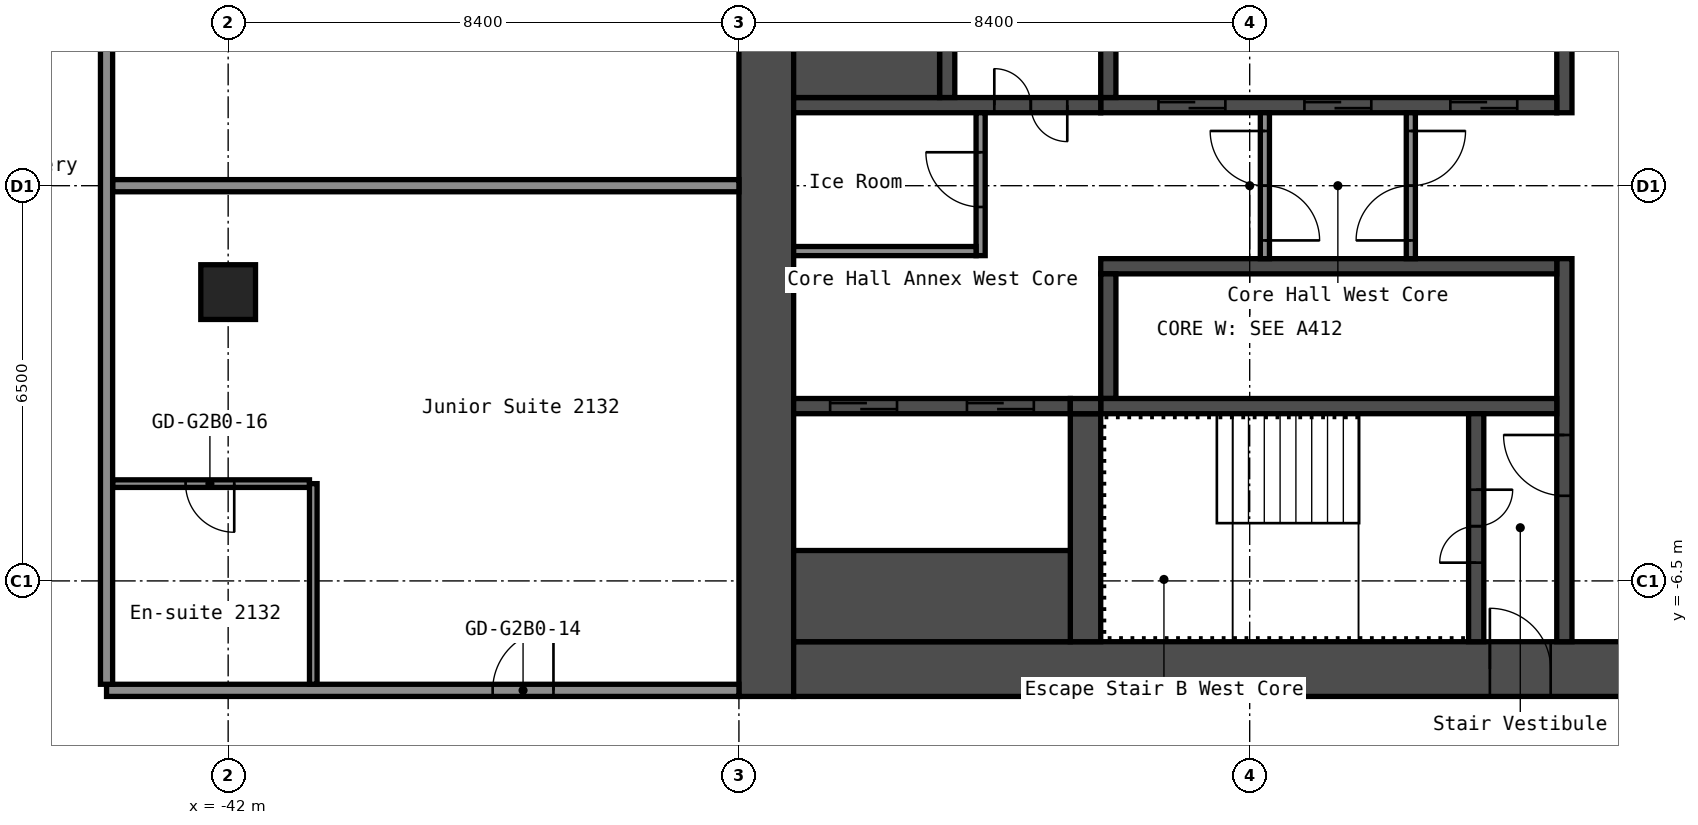
"""IFC4 building model, lengths in metres.
Left out: names, types, materials, properties, quantities, classifications, styles, units other than length and angle.
Written with IfcOpenShell. Run it as: python <this file> out.ifc"""

import sys

from ifc_helpers import new_model, si_unit, direction, frame, frame_2d, origin, origin_2d, place, context, subcontext, project, spatial, rectangle, hollow_rectangle, extrude, element, fill, save


model = new_model("IFC4")
c1 = context("Model", 3, precision=1e-05, world=origin(), true_north=direction((0.0, 1.0)))
c2 = subcontext(c1, "Body", "Model", "MODEL_VIEW")
j1 = project(units=[si_unit("LENGTHUNIT", "METRE"), si_unit("PLANEANGLEUNIT", "RADIAN")], contexts=[c1])
p1 = place(None, origin())
s1 = spatial("IfcSite", under=j1, at=p1, CompositionType="ELEMENT")
p2 = place(p1, origin())
s2 = spatial("IfcBuilding", under=s1, at=p2, CompositionType="ELEMENT")
p3 = place(p2, frame((0.0, 0.0, 78.6)))
s3 = spatial("IfcBuildingStorey", under=s2, at=p3, CompositionType="ELEMENT", Elevation=78.6)
p4 = place(p3, frame((-42.0, -1.75, 0.0), z_axis=(0.0, 0.0, 1.0), x_axis=(1.0, 0.0, 0.0)))
e1 = element("IfcColumn", 1, at=p4, inside=s3, PredefinedType="COLUMN", context=c2, shape_type="SweptSolid", body=[
    extrude(hollow_rectangle(XDim=0.9, YDim=0.9, WallThickness=0.036, at=origin_2d()), origin(), (0.0, 0.0, 1.0), 2.8),
])
p5 = place(p3, frame((-33.15, -8.4, 0.0), z_axis=(0.0, 0.0, 1.0), x_axis=(0.0, 1.0, 0.0)))
e2 = element("IfcWall", 2, at=p5, inside=s3, PredefinedType="SHEAR", context=c2, shape_type="SweptSolid", body=[
    extrude(rectangle(XDim=16.8, YDim=0.9, at=frame_2d((8.4, 0.0))), origin(), (0.0, 0.0, 1.0), 2.8),
])
p6 = place(p3, frame((-32.7, -7.95, 0.0), z_axis=(0.0, 0.0, 1.0), x_axis=(1.0, 0.0, 0.0)))
e3 = element("IfcWall", 3, at=p6, inside=s3, PredefinedType="SHEAR", context=c2, shape_type="SweptSolid", body=[
    extrude(rectangle(XDim=15.0, YDim=0.9, at=frame_2d((7.5, 0.0))), origin(), (0.0, 0.0, 1.0), 2.8),
])
p7 = place(p6, frame((11.45, 0.0, 0.0)))
e4 = element("IfcOpeningElement", 4, at=p7, cuts=e3, PredefinedType="OPENING", context=c2, shape_type="SweptSolid", body=[
    extrude(rectangle(XDim=1.0, YDim=2.1, at=frame_2d((0.5, 1.05))), frame((0.0, 0.46, 0.0), z_axis=(0.0, -1.0, 0.0), x_axis=(1.0, 0.0, 0.0)), (0.0, 0.0, 1.0), 0.92),
])
p8 = place(p3, frame((-20.025, 1.2, 0.0), z_axis=(0.0, 0.0, 1.0), x_axis=(0.0, 1.0, 0.0)))
e5 = element("IfcWall", 5, at=p8, inside=s3, PredefinedType="SHEAR", context=c2, shape_type="SweptSolid", body=[
    extrude(rectangle(XDim=6.3, YDim=0.25, at=frame_2d((3.15, 0.0))), origin(), (0.0, 0.0, 1.0), 2.8),
])
p9 = place(p3, frame((-20.025, -7.5, 0.0), z_axis=(0.0, 0.0, 1.0), x_axis=(0.0, 1.0, 0.0)))
e6 = element("IfcWall", 6, at=p9, inside=s3, PredefinedType="SHEAR", context=c2, shape_type="SweptSolid", body=[
    extrude(rectangle(XDim=6.3, YDim=0.25, at=frame_2d((3.15, 0.0))), origin(), (0.0, 0.0, 1.0), 2.8),
])
p10 = place(p9, frame((2.4, 0.0, 0.0)))
e7 = element("IfcOpeningElement", 7, at=p10, cuts=e6, PredefinedType="OPENING", context=c2, shape_type="SweptSolid", body=[
    extrude(rectangle(XDim=1.0, YDim=2.1, at=frame_2d((0.5, 1.05))), frame((0.0, 0.135, 0.0), z_axis=(0.0, -1.0, 0.0), x_axis=(1.0, 0.0, 0.0)), (0.0, 0.0, 1.0), 0.27),
])
p11 = place(p3, frame((-27.65, 1.325, 0.0), z_axis=(0.0, 0.0, 1.0), x_axis=(1.0, 0.0, 0.0)))
e8 = element("IfcWall", 8, at=p11, inside=s3, PredefinedType="SHEAR", context=c2, shape_type="SweptSolid", body=[
    extrude(rectangle(XDim=7.5, YDim=0.25, at=frame_2d((3.75, 0.0))), origin(), (0.0, 0.0, 1.0), 2.8),
])
p12 = place(p11, frame((5.75, 0.0, 0.0)))
e9 = element("IfcOpeningElement", 9, at=p12, cuts=e8, PredefinedType="OPENING", context=c2, shape_type="SweptSolid", body=[
    extrude(rectangle(XDim=1.1, YDim=2.1, at=frame_2d((0.55, 1.05))), frame((0.0, 0.135, 0.0), z_axis=(0.0, -1.0, 0.0), x_axis=(1.0, 0.0, 0.0)), (0.0, 0.0, 1.0), 0.27),
])
p13 = place(p11, frame((3.35, 0.0, 0.0)))
e10 = element("IfcOpeningElement", 10, at=p13, cuts=e8, PredefinedType="OPENING", context=c2, shape_type="SweptSolid", body=[
    extrude(rectangle(XDim=1.1, YDim=2.1, at=frame_2d((0.55, 1.05))), frame((0.0, 0.135, 0.0), z_axis=(0.0, -1.0, 0.0), x_axis=(1.0, 0.0, 0.0)), (0.0, 0.0, 1.0), 0.27),
])
p14 = place(p11, frame((0.95, 0.0, 0.0)))
e11 = element("IfcOpeningElement", 11, at=p14, cuts=e8, PredefinedType="OPENING", context=c2, shape_type="SweptSolid", body=[
    extrude(rectangle(XDim=1.1, YDim=2.1, at=frame_2d((0.55, 1.05))), frame((0.0, 0.135, 0.0), z_axis=(0.0, -1.0, 0.0), x_axis=(1.0, 0.0, 0.0)), (0.0, 0.0, 1.0), 0.27),
])
p15 = place(p3, frame((-27.525, 1.45, 0.0), z_axis=(0.0, 0.0, 1.0), x_axis=(0.0, 1.0, 0.0)))
e12 = element("IfcWall", 12, at=p15, inside=s3, PredefinedType="SHEAR", context=c2, shape_type="SweptSolid", body=[
    extrude(rectangle(XDim=2.05, YDim=0.25, at=frame_2d((1.025, 0.0))), origin(), (0.0, 0.0, 1.0), 2.8),
])
p16 = place(p3, frame((-32.7, 1.325, 0.0), z_axis=(0.0, 0.0, 1.0), x_axis=(1.0, 0.0, 0.0)))
e13 = element("IfcWall", 13, at=p16, inside=s3, PredefinedType="SHEAR", context=c2, shape_type="SweptSolid", body=[
    extrude(rectangle(XDim=5.05, YDim=0.25, at=frame_2d((2.525, 0.0))), origin(), (0.0, 0.0, 1.0), 2.8),
])
p17 = place(p16, frame((3.3, 0.0, 0.0)))
e14 = element("IfcOpeningElement", 14, at=p17, cuts=e13, PredefinedType="OPENING", context=c2, shape_type="SweptSolid", body=[
    extrude(rectangle(XDim=1.2, YDim=2.1, at=frame_2d((0.6, 1.05))), frame((0.0, 0.135, 0.0), z_axis=(0.0, -1.0, 0.0), x_axis=(1.0, 0.0, 0.0)), (0.0, 0.0, 1.0), 0.27),
])
p18 = place(p3, frame((-30.175, 1.45, 0.0), z_axis=(0.0, 0.0, 1.0), x_axis=(0.0, 1.0, 0.0)))
e15 = element("IfcWall", 15, at=p18, inside=s3, PredefinedType="SHEAR", context=c2, shape_type="SweptSolid", body=[
    extrude(rectangle(XDim=6.05, YDim=0.25, at=frame_2d((3.025, 0.0))), origin(), (0.0, 0.0, 1.0), 2.8),
])
p19 = place(p18, frame((2.625, 0.0, 0.0)))
e16 = element("IfcOpeningElement", 16, at=p19, cuts=e15, PredefinedType="OPENING", context=c2, shape_type="SweptSolid", body=[
    extrude(rectangle(XDim=1.1, YDim=2.1, at=frame_2d((0.55, 1.05))), frame((0.0, 0.135, 0.0), z_axis=(0.0, -1.0, 0.0), x_axis=(1.0, 0.0, 0.0)), (0.0, 0.0, 1.0), 0.27),
])
p20 = place(p3, frame((-32.7, 2.375, 0.0), z_axis=(0.0, 0.0, 1.0), x_axis=(1.0, 0.0, 0.0)))
e17 = element("IfcWall", 17, at=p20, inside=s3, PredefinedType="SHEAR", context=c2, shape_type="SweptSolid", body=[
    extrude(rectangle(XDim=2.4, YDim=1.85, at=frame_2d((1.2, 0.0))), origin(), (0.0, 0.0, 1.0), 2.8),
])
p21 = place(p3, frame((-27.65, -1.325, 0.0), z_axis=(0.0, 0.0, 1.0), x_axis=(1.0, 0.0, 0.0)))
e18 = element("IfcWall", 18, at=p21, inside=s3, PredefinedType="SHEAR", context=c2, shape_type="SweptSolid", body=[
    extrude(rectangle(XDim=7.5, YDim=0.25, at=frame_2d((3.75, 0.0))), origin(), (0.0, 0.0, 1.0), 2.8),
])
p22 = place(p3, frame((-27.525, -3.5, 0.0), z_axis=(0.0, 0.0, 1.0), x_axis=(0.0, 1.0, 0.0)))
e19 = element("IfcWall", 19, at=p22, inside=s3, PredefinedType="SHEAR", context=c2, shape_type="SweptSolid", body=[
    extrude(rectangle(XDim=2.05, YDim=0.25, at=frame_2d((1.025, 0.0))), origin(), (0.0, 0.0, 1.0), 2.8),
])
p23 = place(p3, frame((-27.65, -3.625, 0.0), z_axis=(0.0, 0.0, 1.0), x_axis=(1.0, 0.0, 0.0)))
e20 = element("IfcWall", 20, at=p23, inside=s3, PredefinedType="SHEAR", context=c2, shape_type="SweptSolid", body=[
    extrude(rectangle(XDim=7.5, YDim=0.25, at=frame_2d((3.75, 0.0))), origin(), (0.0, 0.0, 1.0), 2.8),
])
p24 = place(p3, frame((-21.475, -7.5, 0.0), z_axis=(0.0, 0.0, 1.0), x_axis=(0.0, 1.0, 0.0)))
e21 = element("IfcWall", 21, at=p24, inside=s3, PredefinedType="SHEAR", context=c2, shape_type="SweptSolid", body=[
    extrude(rectangle(XDim=3.75, YDim=0.25, at=frame_2d((1.875, 0.0))), origin(), (0.0, 0.0, 1.0), 2.8),
])
p25 = place(p24, frame((1.3, 0.0, 0.0)))
e22 = element("IfcOpeningElement", 22, at=p25, cuts=e21, PredefinedType="OPENING", context=c2, shape_type="SweptSolid", body=[
    extrude(rectangle(XDim=1.2, YDim=2.1, at=frame_2d((0.6, 1.05))), frame((0.0, 0.135, 0.0), z_axis=(0.0, -1.0, 0.0), x_axis=(1.0, 0.0, 0.0)), (0.0, 0.0, 1.0), 0.27),
])
p26 = place(p3, frame((-27.9, -7.5, 0.0), z_axis=(0.0, 0.0, 1.0), x_axis=(0.0, 1.0, 0.0)))
e23 = element("IfcWall", 23, at=p26, inside=s3, PredefinedType="SHEAR", context=c2, shape_type="SweptSolid", body=[
    extrude(rectangle(XDim=3.75, YDim=0.5, at=frame_2d((1.875, 0.0))), origin(), (0.0, 0.0, 1.0), 2.8),
])
p27 = place(p3, frame((-32.7, -3.625, 0.0), z_axis=(0.0, 0.0, 1.0), x_axis=(1.0, 0.0, 0.0)))
e24 = element("IfcWall", 24, at=p27, inside=s3, PredefinedType="SHEAR", context=c2, shape_type="SweptSolid", body=[
    extrude(rectangle(XDim=4.55, YDim=0.25, at=frame_2d((2.275, 0.0))), origin(), (0.0, 0.0, 1.0), 2.8),
])
p28 = place(p27, frame((2.85, 0.0, 0.0)))
e25 = element("IfcOpeningElement", 25, at=p28, cuts=e24, PredefinedType="OPENING", context=c2, shape_type="SweptSolid", body=[
    extrude(rectangle(XDim=1.1, YDim=2.1, at=frame_2d((0.55, 1.05))), frame((0.0, 0.135, 0.0), z_axis=(0.0, -1.0, 0.0), x_axis=(1.0, 0.0, 0.0)), (0.0, 0.0, 1.0), 0.27),
])
p29 = place(p27, frame((0.6, 0.0, 0.0)))
e26 = element("IfcOpeningElement", 26, at=p29, cuts=e24, PredefinedType="OPENING", context=c2, shape_type="SweptSolid", body=[
    extrude(rectangle(XDim=1.1, YDim=2.1, at=frame_2d((0.55, 1.05))), frame((0.0, 0.135, 0.0), z_axis=(0.0, -1.0, 0.0), x_axis=(1.0, 0.0, 0.0)), (0.0, 0.0, 1.0), 0.27),
])
p30 = place(p3, frame((-32.7, -6.75, 0.0), z_axis=(0.0, 0.0, 1.0), x_axis=(1.0, 0.0, 0.0)))
e27 = element("IfcWall", 27, at=p30, inside=s3, PredefinedType="SHEAR", context=c2, shape_type="SweptSolid", body=[
    extrude(rectangle(XDim=4.55, YDim=1.5, at=frame_2d((2.275, 0.0))), origin(), (0.0, 0.0, 1.0), 2.8),
])
p31 = place(p3, frame((-28.15, -3.625, 0.0), z_axis=(0.0, 0.0, 1.0), x_axis=(1.0, 0.0, 0.0)))
e28 = element("IfcWall", 28, at=p31, inside=s3, PredefinedType="SHEAR", context=c2, shape_type="SweptSolid", body=[
    extrude(rectangle(XDim=0.5, YDim=0.25, at=frame_2d((0.25, 0.0))), origin(), (0.0, 0.0, 1.0), 2.8),
])
p32 = place(p3, frame((-22.55, -1.2, 0.0), z_axis=(0.0, 0.0, 1.0), x_axis=(0.0, 1.0, 0.0)))
e29 = element("IfcWall", 29, at=p32, inside=s3, PredefinedType="PARTITIONING", context=c2, shape_type="SweptSolid", body=[
    extrude(rectangle(XDim=2.4, YDim=0.15, at=frame_2d((1.2, 0.0))), origin(), (0.0, 0.0, 1.0), 2.8),
])
p33 = place(p32, frame((0.3, 0.0, 0.0)))
e30 = element("IfcOpeningElement", 30, at=p33, cuts=e29, PredefinedType="OPENING", context=c2, shape_type="SweptSolid", body=[
    extrude(rectangle(XDim=1.8, YDim=2.1, at=frame_2d((0.9, 1.05))), frame((0.0, 0.085, 0.0), z_axis=(0.0, -1.0, 0.0), x_axis=(1.0, 0.0, 0.0)), (0.0, 0.0, 1.0), 0.17),
])
p34 = place(p3, frame((-24.95, -1.2, 0.0), z_axis=(0.0, 0.0, 1.0), x_axis=(0.0, 1.0, 0.0)))
e31 = element("IfcWall", 31, at=p34, inside=s3, PredefinedType="PARTITIONING", context=c2, shape_type="SweptSolid", body=[
    extrude(rectangle(XDim=2.4, YDim=0.15, at=frame_2d((1.2, 0.0))), origin(), (0.0, 0.0, 1.0), 2.8),
])
p35 = place(p34, frame((0.3, 0.0, 0.0)))
e32 = element("IfcOpeningElement", 32, at=p35, cuts=e31, PredefinedType="OPENING", context=c2, shape_type="SweptSolid", body=[
    extrude(rectangle(XDim=1.8, YDim=2.1, at=frame_2d((0.9, 1.05))), frame((0.0, 0.085, 0.0), z_axis=(0.0, -1.0, 0.0), x_axis=(1.0, 0.0, 0.0)), (0.0, 0.0, 1.0), 0.17),
])
p36 = place(p3, frame((-29.625, -1.15, 0.0), z_axis=(0.0, 0.0, 1.0), x_axis=(0.0, 1.0, 0.0)))
e33 = element("IfcWall", 33, at=p36, inside=s3, PredefinedType="PARTITIONING", context=c2, shape_type="SweptSolid", body=[
    extrude(rectangle(XDim=2.35, YDim=0.15, at=frame_2d((1.175, 0.0))), origin(), (0.0, 0.0, 1.0), 2.8),
])
p37 = place(p36, frame((0.8, 0.0, 0.0)))
e34 = element("IfcOpeningElement", 34, at=p37, cuts=e33, PredefinedType="OPENING", context=c2, shape_type="SweptSolid", body=[
    extrude(rectangle(XDim=0.9, YDim=2.1, at=frame_2d((0.45, 1.05))), frame((0.0, 0.085, 0.0), z_axis=(0.0, -1.0, 0.0), x_axis=(1.0, 0.0, 0.0)), (0.0, 0.0, 1.0), 0.17),
])
p38 = place(p3, frame((-32.7, -1.075, 0.0), z_axis=(0.0, 0.0, 1.0), x_axis=(1.0, 0.0, 0.0)))
e35 = element("IfcWall", 35, at=p38, inside=s3, PredefinedType="PARTITIONING", context=c2, shape_type="SweptSolid", body=[
    extrude(rectangle(XDim=3.0, YDim=0.15, at=frame_2d((1.5, 0.0))), origin(), (0.0, 0.0, 1.0), 2.8),
])
p39 = place(p3, frame((-44.0, -8.3, 0.0), z_axis=(0.0, 0.0, 1.0), x_axis=(1.0, 0.0, 0.0)))
e36 = element("IfcWall", 36, at=p39, inside=s3, PredefinedType="PARTITIONING", context=c2, shape_type="SweptSolid", body=[
    extrude(rectangle(XDim=10.4, YDim=0.2, at=frame_2d((5.2, 0.0))), origin(), (0.0, 0.0, 1.0), 2.8),
])
p40 = place(p39, frame((6.35, 0.0, 0.0)))
e37 = element("IfcOpeningElement", 37, at=p40, cuts=e36, PredefinedType="OPENING", context=c2, shape_type="SweptSolid", body=[
    extrude(rectangle(XDim=1.0, YDim=2.1, at=frame_2d((0.5, 1.05))), frame((0.0, 0.11, 0.0), z_axis=(0.0, -1.0, 0.0), x_axis=(1.0, 0.0, 0.0)), (0.0, 0.0, 1.0), 0.22),
])
p41 = place(p3, frame((-43.9, -4.9, 0.0), z_axis=(0.0, 0.0, 1.0), x_axis=(1.0, 0.0, 0.0)))
e38 = element("IfcWall", 38, at=p41, inside=s3, PredefinedType="PARTITIONING", context=c2, shape_type="SweptSolid", body=[
    extrude(rectangle(XDim=3.237, YDim=0.125, at=frame_2d((1.619, 0.0))), origin(), (0.0, 0.0, 1.0), 2.8),
])
p42 = place(p41, frame((1.2, 0.0, 0.0)))
e39 = element("IfcOpeningElement", 39, at=p42, cuts=e38, PredefinedType="OPENING", context=c2, shape_type="SweptSolid", body=[
    extrude(rectangle(XDim=0.8, YDim=2.1, at=frame_2d((0.4, 1.05))), frame((0.0, 0.073, 0.0), z_axis=(0.0, -1.0, 0.0), x_axis=(1.0, 0.0, 0.0)), (0.0, 0.0, 1.0), 0.145),
])
p43 = place(p3, frame((-43.9, 0.0, 0.0), z_axis=(0.0, 0.0, 1.0), x_axis=(1.0, 0.0, 0.0)))
e40 = element("IfcWall", 40, at=p43, inside=s3, PredefinedType="PARTITIONING", context=c2, shape_type="SweptSolid", body=[
    extrude(rectangle(XDim=10.3, YDim=0.2, at=frame_2d((5.15, 0.0))), origin(), (0.0, 0.0, 1.0), 2.8),
])
p44 = place(p3, frame((-44.0, -8.2, 0.0), z_axis=(0.0, 0.0, 1.0), x_axis=(0.0, 1.0, 0.0)))
e41 = element("IfcWall", 41, at=p44, inside=s3, PredefinedType="PARTITIONING", context=c2, shape_type="SweptSolid", body=[
    extrude(rectangle(XDim=16.4, YDim=0.2, at=frame_2d((8.2, 0.0))), origin(), (0.0, 0.0, 1.0), 2.8),
])
p45 = place(p3, frame((-40.6, -8.2, 0.0), z_axis=(0.0, 0.0, 1.0), x_axis=(0.0, 1.0, 0.0)))
e42 = element("IfcWall", 42, at=p45, inside=s3, PredefinedType="PARTITIONING", context=c2, shape_type="SweptSolid", body=[
    extrude(rectangle(XDim=3.3, YDim=0.125, at=frame_2d((1.65, 0.0))), origin(), (0.0, 0.0, 1.0), 2.8),
])
p46 = place(p7, origin())
e43 = element("IfcDoor", 43, at=p46, inside=s3, OperationType="SINGLE_SWING_RIGHT", PredefinedType="DOOR", context=c2, shape_type="SweptSolid", body=[
    extrude(rectangle(XDim=1.0, YDim=2.1, at=frame_2d((0.5, 1.05))), frame((0.0, 0.025, 0.0), z_axis=(0.0, -1.0, 0.0), x_axis=(1.0, 0.0, 0.0)), (0.0, 0.0, 1.0), 0.05),
])
fill(e4, e43)
p47 = place(p25, origin())
e44 = element("IfcDoor", 44, at=p47, inside=s3, OperationType="DOUBLE_DOOR_SINGLE_SWING", PredefinedType="DOOR", context=c2, shape_type="SweptSolid", body=[
    extrude(rectangle(XDim=1.2, YDim=2.1, at=frame_2d((0.6, 1.05))), frame((0.0, 0.025, 0.0), z_axis=(0.0, -1.0, 0.0), x_axis=(1.0, 0.0, 0.0)), (0.0, 0.0, 1.0), 0.05),
])
fill(e22, e44)
p48 = place(p10, origin())
e45 = element("IfcDoor", 45, at=p48, inside=s3, OperationType="SINGLE_SWING_LEFT", PredefinedType="DOOR", context=c2, shape_type="SweptSolid", body=[
    extrude(rectangle(XDim=1.0, YDim=2.1, at=frame_2d((0.5, 1.05))), frame((0.0, 0.025, 0.0), z_axis=(0.0, -1.0, 0.0), x_axis=(1.0, 0.0, 0.0)), (0.0, 0.0, 1.0), 0.05),
])
fill(e7, e45)
p49 = place(p17, origin())
e46 = element("IfcDoor", 46, at=p49, inside=s3, OperationType="DOUBLE_DOOR_SINGLE_SWING", PredefinedType="DOOR", context=c2, shape_type="SweptSolid", body=[
    extrude(rectangle(XDim=1.2, YDim=2.1, at=frame_2d((0.6, 1.05))), frame((0.0, 0.025, 0.0), z_axis=(0.0, -1.0, 0.0), x_axis=(1.0, 0.0, 0.0)), (0.0, 0.0, 1.0), 0.05),
])
fill(e14, e46)
p50 = place(p33, origin())
e47 = element("IfcDoor", 47, at=p50, inside=s3, OperationType="DOUBLE_DOOR_SINGLE_SWING", PredefinedType="DOOR", context=c2, shape_type="SweptSolid", body=[
    extrude(rectangle(XDim=1.8, YDim=2.1, at=frame_2d((0.9, 1.05))), frame((0.0, 0.025, 0.0), z_axis=(0.0, -1.0, 0.0), x_axis=(1.0, 0.0, 0.0)), (0.0, 0.0, 1.0), 0.05),
])
fill(e30, e47)
p51 = place(p35, origin())
e48 = element("IfcDoor", 48, at=p51, inside=s3, OperationType="DOUBLE_DOOR_SINGLE_SWING", PredefinedType="DOOR", context=c2, shape_type="SweptSolid", body=[
    extrude(rectangle(XDim=1.8, YDim=2.1, at=frame_2d((0.9, 1.05))), frame((0.0, 0.025, 0.0), z_axis=(0.0, -1.0, 0.0), x_axis=(1.0, 0.0, 0.0)), (0.0, 0.0, 1.0), 0.05),
])
fill(e32, e48)
p52 = place(p37, origin())
e49 = element("IfcDoor", 49, at=p52, inside=s3, OperationType="SINGLE_SWING_LEFT", PredefinedType="DOOR", context=c2, shape_type="SweptSolid", body=[
    extrude(rectangle(XDim=0.9, YDim=2.1, at=frame_2d((0.45, 1.05))), frame((0.0, 0.025, 0.0), z_axis=(0.0, -1.0, 0.0), x_axis=(1.0, 0.0, 0.0)), (0.0, 0.0, 1.0), 0.05),
])
fill(e34, e49)
p53 = place(p12, origin())
e50 = element("IfcDoor", 50, at=p53, inside=s3, OperationType="DOUBLE_DOOR_SLIDING", PredefinedType="DOOR", context=c2, shape_type="SweptSolid", body=[
    extrude(rectangle(XDim=1.1, YDim=2.1, at=frame_2d((0.55, 1.05))), frame((0.0, 0.025, 0.0), z_axis=(0.0, -1.0, 0.0), x_axis=(1.0, 0.0, 0.0)), (0.0, 0.0, 1.0), 0.05),
])
fill(e9, e50)
p54 = place(p13, origin())
e51 = element("IfcDoor", 51, at=p54, inside=s3, OperationType="DOUBLE_DOOR_SLIDING", PredefinedType="DOOR", context=c2, shape_type="SweptSolid", body=[
    extrude(rectangle(XDim=1.1, YDim=2.1, at=frame_2d((0.55, 1.05))), frame((0.0, 0.025, 0.0), z_axis=(0.0, -1.0, 0.0), x_axis=(1.0, 0.0, 0.0)), (0.0, 0.0, 1.0), 0.05),
])
fill(e10, e51)
p55 = place(p14, origin())
e52 = element("IfcDoor", 52, at=p55, inside=s3, OperationType="DOUBLE_DOOR_SLIDING", PredefinedType="DOOR", context=c2, shape_type="SweptSolid", body=[
    extrude(rectangle(XDim=1.1, YDim=2.1, at=frame_2d((0.55, 1.05))), frame((0.0, 0.025, 0.0), z_axis=(0.0, -1.0, 0.0), x_axis=(1.0, 0.0, 0.0)), (0.0, 0.0, 1.0), 0.05),
])
fill(e11, e52)
p56 = place(p28, origin())
e53 = element("IfcDoor", 53, at=p56, inside=s3, OperationType="DOUBLE_DOOR_SLIDING", PredefinedType="DOOR", context=c2, shape_type="SweptSolid", body=[
    extrude(rectangle(XDim=1.1, YDim=2.1, at=frame_2d((0.55, 1.05))), frame((0.0, 0.025, 0.0), z_axis=(0.0, -1.0, 0.0), x_axis=(1.0, 0.0, 0.0)), (0.0, 0.0, 1.0), 0.05),
])
fill(e25, e53)
p57 = place(p29, origin())
e54 = element("IfcDoor", 54, at=p57, inside=s3, OperationType="DOUBLE_DOOR_SLIDING", PredefinedType="DOOR", context=c2, shape_type="SweptSolid", body=[
    extrude(rectangle(XDim=1.1, YDim=2.1, at=frame_2d((0.55, 1.05))), frame((0.0, 0.025, 0.0), z_axis=(0.0, -1.0, 0.0), x_axis=(1.0, 0.0, 0.0)), (0.0, 0.0, 1.0), 0.05),
])
fill(e26, e54)
p58 = place(p40, origin())
e55 = element("IfcDoor", 55, at=p58, inside=s3, OperationType="SINGLE_SWING_LEFT", PredefinedType="DOOR", context=c2, shape_type="SweptSolid", body=[
    extrude(rectangle(XDim=1.0, YDim=2.1, at=frame_2d((0.5, 1.05))), frame((0.0, 0.025, 0.0), z_axis=(0.0, -1.0, 0.0), x_axis=(1.0, 0.0, 0.0)), (0.0, 0.0, 1.0), 0.05),
])
fill(e37, e55)
p59 = place(p42, origin())
e56 = element("IfcDoor", 56, at=p59, inside=s3, OperationType="SINGLE_SWING_RIGHT", PredefinedType="DOOR", context=c2, shape_type="SweptSolid", body=[
    extrude(rectangle(XDim=0.8, YDim=2.1, at=frame_2d((0.4, 1.05))), frame((0.0, 0.025, 0.0), z_axis=(0.0, -1.0, 0.0), x_axis=(1.0, 0.0, 0.0)), (0.0, 0.0, 1.0), 0.05),
])
fill(e39, e56)
save(model, sys.argv[1])
